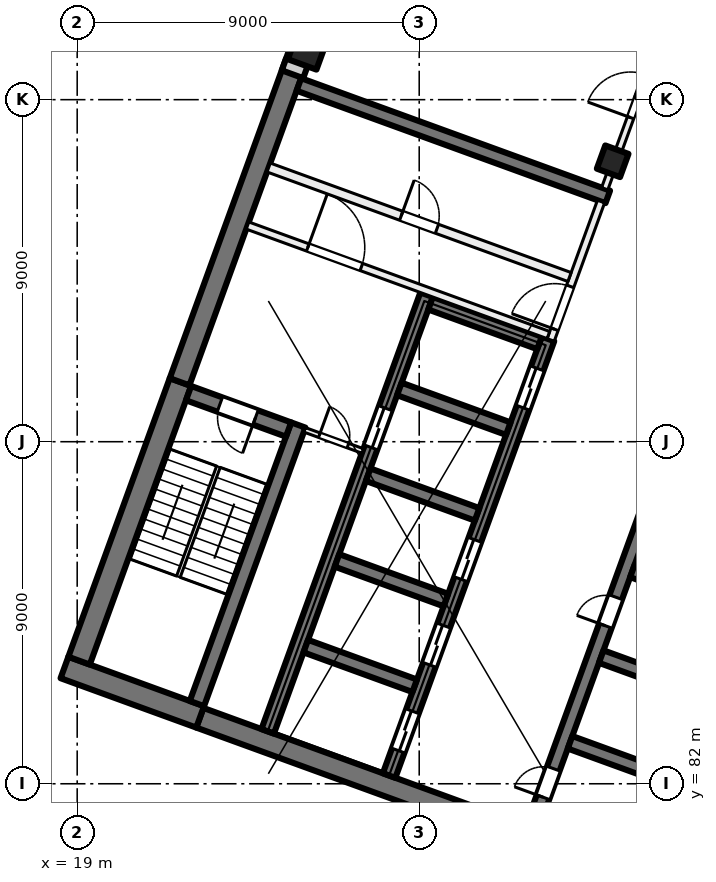
"""IFC4 building model, lengths in metres.
Left out: names, types, materials, properties, quantities, classifications, styles, units other than length and angle.
Written with IfcOpenShell. Run it as: python <this file> out.ifc"""

import sys

from ifc_helpers import new_model, si_unit, direction, frame, frame_2d, origin, origin_2d, place, context, subcontext, project, spatial, rectangle, extrude, element, fill, save


model = new_model("IFC4")
c1 = context("Model", 3, precision=1e-05, world=origin(), true_north=direction((0.0, 1.0)))
c2 = subcontext(c1, "Body", "Model", "MODEL_VIEW")
j1 = project(units=[si_unit("LENGTHUNIT", "METRE"), si_unit("PLANEANGLEUNIT", "RADIAN")], contexts=[c1])
p1 = place(None, origin())
s1 = spatial("IfcSite", under=j1, at=p1, CompositionType="ELEMENT")
p2 = place(p1, origin())
s2 = spatial("IfcBuilding", under=s1, at=p2, CompositionType="ELEMENT")
p3 = place(p2, frame((0.0, 0.0, 162.5)))
s3 = spatial("IfcBuildingStorey", under=s2, at=p3, CompositionType="ELEMENT", Elevation=162.5)
p4 = place(p3, frame((33.091, 98.379, 0.0), z_axis=(0.0, 0.0, 1.0), x_axis=(-0.342020143326, -0.939692620786, 0.0)))
e1 = element("IfcColumn", 1, at=p4, inside=s3, PredefinedType="COLUMN", context=c2, shape_type="SweptSolid", body=[
    extrude(rectangle(XDim=0.65, YDim=0.65, at=origin_2d()), origin(), (0.0, 0.0, 1.0), 4.0),
])
p5 = place(p3, frame((25.056, 101.303, 0.0), z_axis=(0.0, 0.0, 1.0), x_axis=(-0.342020143326, -0.939692620786, 0.0)))
e2 = element("IfcColumn", 2, at=p5, inside=s3, PredefinedType="COLUMN", context=c2, shape_type="SweptSolid", body=[
    extrude(rectangle(XDim=0.8, YDim=0.8, at=origin_2d()), origin(), (0.0, 0.0, 1.0), 4.0),
])
p6 = place(p3, frame((35.759, 78.811, 0.0), z_axis=(0.0, 0.0, 1.0), x_axis=(-0.939692894512, 0.342019391267, 0.0)))
e3 = element("IfcWall", 3, at=p6, inside=s3, PredefinedType="SHEAR", context=c2, shape_type="SweptSolid", body=[
    extrude(rectangle(XDim=14.4, YDim=0.55, at=frame_2d((7.2, 0.0))), origin(), (0.0, 0.0, 1.0), 4.0),
])
p7 = place(p3, frame((22.236, 83.76, 0.0), z_axis=(0.0, 0.0, 1.0), x_axis=(-0.939680822529, 0.342052557032, 0.0)))
e4 = element("IfcWall", 4, at=p7, inside=s3, PredefinedType="SHEAR", context=c2, shape_type="SweptSolid", body=[
    extrude(rectangle(XDim=3.8, YDim=0.6, at=frame_2d((1.9, 0.0))), origin(), (0.0, 0.0, 1.0), 4.0),
])
p8 = place(p3, frame((19.05, 85.239, 0.0), z_axis=(0.0, 0.0, 1.0), x_axis=(0.342016982193, 0.939693771338, 0.0)))
e5 = element("IfcWall", 5, at=p8, inside=s3, PredefinedType="SHEAR", context=c2, shape_type="SweptSolid", body=[
    extrude(rectangle(XDim=7.8, YDim=0.6, at=frame_2d((3.9, 0.0))), origin(), (0.0, 0.0, 1.0), 4.0),
])
p9 = place(p3, frame((21.694, 92.577, 0.0), z_axis=(0.0, 0.0, 1.0), x_axis=(0.342010253184, 0.939696220444, 0.0)))
e6 = element("IfcWall", 6, at=p9, inside=s3, PredefinedType="SHEAR", context=c2, shape_type="SweptSolid", body=[
    extrude(rectangle(XDim=8.95, YDim=0.55, at=frame_2d((4.475, 0.0))), origin(), (0.0, 0.0, 1.0), 4.0),
])
p10 = place(p3, frame((22.15, 84.11, 0.0), z_axis=(0.0, 0.0, 1.0), x_axis=(0.342016982193, 0.939693771338, 0.0)))
e7 = element("IfcWall", 7, at=p10, inside=s3, PredefinedType="SHEAR", context=c2, shape_type="SweptSolid", body=[
    extrude(rectangle(XDim=7.8, YDim=0.4, at=frame_2d((3.9, 0.0))), origin(), (0.0, 0.0, 1.0), 4.0),
])
p11 = place(p3, frame((24.562, 91.32, 0.0), z_axis=(0.0, 0.0, 1.0), x_axis=(-0.939717030584, 0.341953070509, 0.0)))
e8 = element("IfcWall", 8, at=p11, inside=s3, PredefinedType="SHEAR", context=c2, shape_type="SweptSolid", body=[
    extrude(rectangle(XDim=2.8, YDim=0.4, at=frame_2d((1.4, 0.0))), origin(), (0.0, 0.0, 1.0), 4.0),
])
p12 = place(p11, frame((0.925, 0.0, 0.0)))
e9 = element("IfcOpeningElement", 9, at=p12, cuts=e8, PredefinedType="OPENING", context=c2, shape_type="SweptSolid", body=[
    extrude(rectangle(XDim=1.0, YDim=2.1, at=frame_2d((0.5, 1.05))), frame((0.0, 0.21, 0.0), z_axis=(0.0, -1.0, 0.0), x_axis=(1.0, 0.0, 0.0)), (0.0, 0.0, 1.0), 0.42),
])
p13 = place(p3, frame((30.967, 80.848, 0.0), z_axis=(0.0, 0.0, 1.0), x_axis=(0.34201563943, 0.939694260058, 0.0)))
e10 = element("IfcWall", 10, at=p13, inside=s3, PredefinedType="SHEAR", context=c2, shape_type="SweptSolid", body=[
    extrude(rectangle(XDim=12.225, YDim=0.35, at=frame_2d((6.113, 0.0))), origin(), (0.0, 0.0, 1.0), 4.0),
])
p14 = place(p13, frame((0.85, 0.0, 0.0)))
e11 = element("IfcOpeningElement", 11, at=p14, cuts=e10, PredefinedType="OPENING", context=c2, shape_type="SweptSolid", body=[
    extrude(rectangle(XDim=0.8, YDim=2.1, at=frame_2d((0.4, 1.05))), frame((0.0, 0.185, 0.0), z_axis=(0.0, -1.0, 0.0), x_axis=(1.0, 0.0, 0.0)), (0.0, 0.0, 1.0), 0.37),
])
p15 = place(p13, frame((5.65, 0.0, 0.0)))
e12 = element("IfcOpeningElement", 12, at=p15, cuts=e10, PredefinedType="OPENING", context=c2, shape_type="SweptSolid", body=[
    extrude(rectangle(XDim=0.8, YDim=2.1, at=frame_2d((0.4, 1.05))), frame((0.0, 0.185, 0.0), z_axis=(0.0, -1.0, 0.0), x_axis=(1.0, 0.0, 0.0)), (0.0, 0.0, 1.0), 0.37),
])
p16 = place(p3, frame((34.835, 82.047, 0.0), z_axis=(0.0, 0.0, 1.0), x_axis=(-0.939683528043, 0.3420451244, 0.0)))
e13 = element("IfcWall", 13, at=p16, inside=s3, PredefinedType="SHEAR", context=c2, shape_type="SweptSolid", body=[
    extrude(rectangle(XDim=3.05, YDim=0.35, at=frame_2d((1.525, 0.0))), origin(), (0.0, 0.0, 1.0), 4.0),
])
p17 = place(p3, frame((35.656, 84.303, 0.0), z_axis=(0.0, 0.0, 1.0), x_axis=(-0.939709254651, 0.341974438698, 0.0)))
e14 = element("IfcWall", 14, at=p17, inside=s3, PredefinedType="SHEAR", context=c2, shape_type="SweptSolid", body=[
    extrude(rectangle(XDim=3.05, YDim=0.35, at=frame_2d((1.525, 0.0))), origin(), (0.0, 0.0, 1.0), 4.0),
])
p18 = place(p3, frame((36.477, 86.558, 0.0), z_axis=(0.0, 0.0, 1.0), x_axis=(-0.939683528043, 0.3420451244, 0.0)))
e15 = element("IfcWall", 15, at=p18, inside=s3, PredefinedType="SHEAR", context=c2, shape_type="SweptSolid", body=[
    extrude(rectangle(XDim=3.05, YDim=0.35, at=frame_2d((1.525, 0.0))), origin(), (0.0, 0.0, 1.0), 4.0),
])
p19 = place(p3, frame((27.208, 82.216, 0.0), z_axis=(0.0, 0.0, 1.0), x_axis=(0.34201563943, 0.939694260058, 0.0)))
e16 = element("IfcWall", 16, at=p19, inside=s3, PredefinedType="SHEAR", context=c2, shape_type="SweptSolid", body=[
    extrude(rectangle(XDim=12.225, YDim=0.35, at=frame_2d((6.113, 0.0))), origin(), (0.0, 0.0, 1.0), 4.0),
])
p20 = place(p19, frame((0.7, 0.0, 0.0)))
e17 = element("IfcOpeningElement", 17, at=p20, cuts=e16, PredefinedType="OPENING", context=c2, shape_type="SweptSolid", body=[
    extrude(rectangle(XDim=1.1, YDim=2.1, at=frame_2d((0.55, 1.05))), frame((0.0, 0.185, 0.0), z_axis=(0.0, -1.0, 0.0), x_axis=(1.0, 0.0, 0.0)), (0.0, 0.0, 1.0), 0.37),
])
p21 = place(p19, frame((3.1, 0.0, 0.0)))
e18 = element("IfcOpeningElement", 18, at=p21, cuts=e16, PredefinedType="OPENING", context=c2, shape_type="SweptSolid", body=[
    extrude(rectangle(XDim=1.1, YDim=2.1, at=frame_2d((0.55, 1.05))), frame((0.0, 0.185, 0.0), z_axis=(0.0, -1.0, 0.0), x_axis=(1.0, 0.0, 0.0)), (0.0, 0.0, 1.0), 0.37),
])
p22 = place(p19, frame((5.5, 0.0, 0.0)))
e19 = element("IfcOpeningElement", 19, at=p22, cuts=e16, PredefinedType="OPENING", context=c2, shape_type="SweptSolid", body=[
    extrude(rectangle(XDim=1.1, YDim=2.1, at=frame_2d((0.55, 1.05))), frame((0.0, 0.185, 0.0), z_axis=(0.0, -1.0, 0.0), x_axis=(1.0, 0.0, 0.0)), (0.0, 0.0, 1.0), 0.37),
])
p23 = place(p19, frame((10.3, 0.0, 0.0)))
e20 = element("IfcOpeningElement", 20, at=p23, cuts=e16, PredefinedType="OPENING", context=c2, shape_type="SweptSolid", body=[
    extrude(rectangle(XDim=1.1, YDim=2.1, at=frame_2d((0.55, 1.05))), frame((0.0, 0.185, 0.0), z_axis=(0.0, -1.0, 0.0), x_axis=(1.0, 0.0, 0.0)), (0.0, 0.0, 1.0), 0.37),
])
p24 = place(p3, frame((24.013, 83.379, 0.0), z_axis=(0.0, 0.0, 1.0), x_axis=(0.34201563943, 0.939694260058, 0.0)))
e21 = element("IfcWall", 21, at=p24, inside=s3, PredefinedType="SHEAR", context=c2, shape_type="SweptSolid", body=[
    extrude(rectangle(XDim=12.225, YDim=0.35, at=frame_2d((6.113, 0.0))), origin(), (0.0, 0.0, 1.0), 4.0),
])
p25 = place(p24, frame((7.95, 0.0, 0.0)))
e22 = element("IfcOpeningElement", 22, at=p25, cuts=e21, PredefinedType="OPENING", context=c2, shape_type="SweptSolid", body=[
    extrude(rectangle(XDim=1.1, YDim=2.1, at=frame_2d((0.55, 1.05))), frame((0.0, 0.185, 0.0), z_axis=(0.0, -1.0, 0.0), x_axis=(1.0, 0.0, 0.0)), (0.0, 0.0, 1.0), 0.37),
])
for number, where, z_axis, x_axis in (
    (23, (27.881, 84.578, 0.0), (0.0, 0.0, 1.0), (-0.94, 0.342, 0.0)),
    (24, (28.702, 86.833, 0.0), (0.0, 0.0, 1.0), (-0.94, 0.342, 0.0)),
    (25, (29.523, 89.089, 0.0), (0.0, 0.0, 1.0), (-0.94, 0.342, 0.0)),
):
    element("IfcWall", number, at=place(p3, frame(where, z_axis=z_axis, x_axis=x_axis)), inside=s3, PredefinedType="SHEAR", context=c2, shape_type="SweptSolid", body=[
        extrude(rectangle(XDim=3.05, YDim=0.35, at=frame_2d((1.525, 0.0))), origin(), (0.0, 0.0, 1.0), 4.0),
    ])
p26 = place(p3, frame((30.344, 91.344, 0.0), z_axis=(0.0, 0.0, 1.0), x_axis=(-0.939709254651, 0.341974438698, 0.0)))
e26 = element("IfcWall", 26, at=p26, inside=s3, PredefinedType="SHEAR", context=c2, shape_type="SweptSolid", body=[
    extrude(rectangle(XDim=3.05, YDim=0.35, at=frame_2d((1.525, 0.0))), origin(), (0.0, 0.0, 1.0), 4.0),
])
p27 = place(p3, frame((31.165, 93.599, 0.0), z_axis=(0.0, 0.0, 1.0), x_axis=(-0.939683528043, 0.3420451244, 0.0)))
e27 = element("IfcWall", 27, at=p27, inside=s3, PredefinedType="SHEAR", context=c2, shape_type="SweptSolid", body=[
    extrude(rectangle(XDim=3.05, YDim=0.35, at=frame_2d((1.525, 0.0))), origin(), (0.0, 0.0, 1.0), 4.0),
])
p28 = place(p3, frame((32.962, 97.441, 0.0), z_axis=(0.0, 0.0, 1.0), x_axis=(-0.939689545667, 0.342028592028, 0.0)))
e28 = element("IfcWall", 28, at=p28, inside=s3, PredefinedType="SHEAR", context=c2, shape_type="SweptSolid", body=[
    extrude(rectangle(XDim=8.65, YDim=0.35, at=frame_2d((4.325, 0.0))), origin(), (0.0, 0.0, 1.0), 4.0),
])
p29 = place(p3, frame((24.666, 100.669, 0.0), z_axis=(0.0, 0.0, 1.0), x_axis=(0.34201964167, 0.939692803373, 0.0)))
e29 = element("IfcWall", 29, at=p29, inside=s3, PredefinedType="SOLIDWALL", context=c2, shape_type="SweptSolid", body=[
    extrude(rectangle(XDim=32.884, YDim=0.6, at=frame_2d((16.442, 0.0))), origin(), (0.0, 0.0, 1.0), 3.625),
])
p30 = place(p29, frame((1.48, 0.0, 0.9)))
e30 = element("IfcOpeningElement", 30, at=p30, cuts=e29, PredefinedType="OPENING", context=c2, shape_type="SweptSolid", body=[
    extrude(rectangle(XDim=3.0, YDim=2.4, at=frame_2d((1.5, 1.2))), frame((0.0, 0.31, 0.0), z_axis=(0.0, -1.0, 0.0), x_axis=(1.0, 0.0, 0.0)), (0.0, 0.0, 1.0), 0.62),
])
p31 = place(p29, frame((5.98, 0.0, 0.9)))
e31 = element("IfcOpeningElement", 31, at=p31, cuts=e29, PredefinedType="OPENING", context=c2, shape_type="SweptSolid", body=[
    extrude(rectangle(XDim=3.0, YDim=2.4, at=frame_2d((1.5, 1.2))), frame((0.0, 0.31, 0.0), z_axis=(0.0, -1.0, 0.0), x_axis=(1.0, 0.0, 0.0)), (0.0, 0.0, 1.0), 0.62),
])
p32 = place(p29, frame((10.48, 0.0, 0.9)))
e32 = element("IfcOpeningElement", 32, at=p32, cuts=e29, PredefinedType="OPENING", context=c2, shape_type="SweptSolid", body=[
    extrude(rectangle(XDim=3.0, YDim=2.4, at=frame_2d((1.5, 1.2))), frame((0.0, 0.31, 0.0), z_axis=(0.0, -1.0, 0.0), x_axis=(1.0, 0.0, 0.0)), (0.0, 0.0, 1.0), 0.62),
])
p33 = place(p29, frame((14.98, 0.0, 0.9)))
e33 = element("IfcOpeningElement", 33, at=p33, cuts=e29, PredefinedType="OPENING", context=c2, shape_type="SweptSolid", body=[
    extrude(rectangle(XDim=3.0, YDim=2.4, at=frame_2d((1.5, 1.2))), frame((0.0, 0.31, 0.0), z_axis=(0.0, -1.0, 0.0), x_axis=(1.0, 0.0, 0.0)), (0.0, 0.0, 1.0), 0.62),
])
p34 = place(p29, frame((19.48, 0.0, 0.9)))
e34 = element("IfcOpeningElement", 34, at=p34, cuts=e29, PredefinedType="OPENING", context=c2, shape_type="SweptSolid", body=[
    extrude(rectangle(XDim=3.0, YDim=2.4, at=frame_2d((1.5, 1.2))), frame((0.0, 0.31, 0.0), z_axis=(0.0, -1.0, 0.0), x_axis=(1.0, 0.0, 0.0)), (0.0, 0.0, 1.0), 0.62),
])
p35 = place(p29, frame((23.98, 0.0, 0.9)))
e35 = element("IfcOpeningElement", 35, at=p35, cuts=e29, PredefinedType="OPENING", context=c2, shape_type="SweptSolid", body=[
    extrude(rectangle(XDim=3.0, YDim=2.4, at=frame_2d((1.5, 1.2))), frame((0.0, 0.31, 0.0), z_axis=(0.0, -1.0, 0.0), x_axis=(1.0, 0.0, 0.0)), (0.0, 0.0, 1.0), 0.62),
])
p36 = place(p29, frame((28.48, 0.0, 0.9)))
e36 = element("IfcOpeningElement", 36, at=p36, cuts=e29, PredefinedType="OPENING", context=c2, shape_type="SweptSolid", body=[
    extrude(rectangle(XDim=3.0, YDim=2.4, at=frame_2d((1.5, 1.2))), frame((0.0, 0.31, 0.0), z_axis=(0.0, -1.0, 0.0), x_axis=(1.0, 0.0, 0.0)), (0.0, 0.0, 1.0), 0.62),
])
p37 = place(p3, frame((31.459, 93.678, 0.0), z_axis=(0.0, 0.0, 1.0), x_axis=(0.341985870128, 0.939705094502, 0.0)))
e37 = element("IfcWall", 37, at=p37, inside=s3, PredefinedType="PARTITIONING", context=c2, shape_type="SweptSolid", body=[
    extrude(rectangle(XDim=3.875, YDim=0.2, at=frame_2d((1.938, 0.0))), origin(), (0.0, 0.0, 1.0), 3.625),
])
p38 = place(p37, frame((0.3, 0.0, 0.0)))
e38 = element("IfcOpeningElement", 38, at=p38, cuts=e37, PredefinedType="OPENING", context=c2, shape_type="SweptSolid", body=[
    extrude(rectangle(XDim=1.2, YDim=2.1, at=frame_2d((0.6, 1.05))), frame((0.0, 0.11, 0.0), z_axis=(0.0, -1.0, 0.0), x_axis=(1.0, 0.0, 0.0)), (0.0, 0.0, 1.0), 0.22),
])
p39 = place(p3, frame((23.483, 96.688, 0.0), z_axis=(0.0, 0.0, 1.0), x_axis=(0.939691007314, -0.342024576271, 0.0)))
e39 = element("IfcWall", 39, at=p39, inside=s3, PredefinedType="PARTITIONING", context=c2, shape_type="SweptSolid", body=[
    extrude(rectangle(XDim=8.425, YDim=0.2, at=frame_2d((4.212, 0.0))), origin(), (0.0, 0.0, 1.0), 3.625),
])
p40 = place(p39, frame((1.688, 0.0, 0.0)))
e40 = element("IfcOpeningElement", 40, at=p40, cuts=e39, PredefinedType="OPENING", context=c2, shape_type="SweptSolid", body=[
    extrude(rectangle(XDim=1.5, YDim=2.1, at=frame_2d((0.75, 1.05))), frame((0.0, 0.11, 0.0), z_axis=(0.0, -1.0, 0.0), x_axis=(1.0, 0.0, 0.0)), (0.0, 0.0, 1.0), 0.22),
])
p41 = place(p3, frame((24.039, 98.215, 0.0), z_axis=(0.0, 0.0, 1.0), x_axis=(0.939687617333, -0.342033889887, 0.0)))
e41 = element("IfcWall", 41, at=p41, inside=s3, PredefinedType="PARTITIONING", context=c2, shape_type="SweptSolid", body=[
    extrude(rectangle(XDim=8.425, YDim=0.25, at=frame_2d((4.212, 0.0))), origin(), (0.0, 0.0, 1.0), 3.625),
])
p42 = place(p41, frame((3.712, 0.0, 0.0)))
e42 = element("IfcOpeningElement", 42, at=p42, cuts=e41, PredefinedType="OPENING", context=c2, shape_type="SweptSolid", body=[
    extrude(rectangle(XDim=1.0, YDim=2.1, at=frame_2d((0.5, 1.05))), frame((0.0, 0.135, 0.0), z_axis=(0.0, -1.0, 0.0), x_axis=(1.0, 0.0, 0.0)), (0.0, 0.0, 1.0), 0.27),
])
p43 = place(p3, frame((24.985, 91.312, 0.0), z_axis=(0.0, 0.0, 1.0), x_axis=(0.939705651352, -0.341984340019, 0.0)))
e43 = element("IfcWall", 43, at=p43, inside=s3, PredefinedType="PARTITIONING", context=c2, shape_type="SweptSolid", body=[
    extrude(rectangle(XDim=1.625, YDim=0.125, at=frame_2d((0.812, 0.0))), origin(), (0.0, 0.0, 1.0), 3.625),
])
p44 = place(p43, frame((0.413, 0.0, 0.0)))
e44 = element("IfcOpeningElement", 44, at=p44, cuts=e43, PredefinedType="OPENING", context=c2, shape_type="SweptSolid", body=[
    extrude(rectangle(XDim=0.8, YDim=2.1, at=frame_2d((0.4, 1.05))), frame((0.0, 0.073, 0.0), z_axis=(0.0, -1.0, 0.0), x_axis=(1.0, 0.0, 0.0)), (0.0, 0.0, 1.0), 0.145),
])
p45 = place(p3, frame((32.881, 97.657, 0.0), z_axis=(0.0, 0.0, 1.0), x_axis=(0.342058204353, 0.939678766832, 0.0)))
e45 = element("IfcWall", 45, at=p45, inside=s3, PredefinedType="PARTITIONING", context=c2, shape_type="SweptSolid", body=[
    extrude(rectangle(XDim=5.163, YDim=0.175, at=frame_2d((2.581, 0.0))), origin(), (0.0, 0.0, 1.0), 3.625),
])
p46 = place(p45, frame((1.991, 0.0, 0.0)))
e46 = element("IfcOpeningElement", 46, at=p46, cuts=e45, PredefinedType="OPENING", context=c2, shape_type="SweptSolid", body=[
    extrude(rectangle(XDim=1.2, YDim=2.1, at=frame_2d((0.6, 1.05))), frame((0.0, 0.097, 0.0), z_axis=(0.0, -1.0, 0.0), x_axis=(1.0, 0.0, 0.0)), (0.0, 0.0, 1.0), 0.195),
])
p47 = place(p20, origin())
e47 = element("IfcDoor", 47, at=p47, inside=s3, OperationType="DOUBLE_DOOR_SLIDING", PredefinedType="DOOR", context=c2, shape_type="SweptSolid", body=[
    extrude(rectangle(XDim=1.1, YDim=2.1, at=frame_2d((0.55, 1.05))), frame((0.0, 0.025, 0.0), z_axis=(0.0, -1.0, 0.0), x_axis=(1.0, 0.0, 0.0)), (0.0, 0.0, 1.0), 0.05),
])
fill(e17, e47)
p48 = place(p21, origin())
e48 = element("IfcDoor", 48, at=p48, inside=s3, OperationType="DOUBLE_DOOR_SLIDING", PredefinedType="DOOR", context=c2, shape_type="SweptSolid", body=[
    extrude(rectangle(XDim=1.1, YDim=2.1, at=frame_2d((0.55, 1.05))), frame((0.0, 0.025, 0.0), z_axis=(0.0, -1.0, 0.0), x_axis=(1.0, 0.0, 0.0)), (0.0, 0.0, 1.0), 0.05),
])
fill(e18, e48)
p49 = place(p22, origin())
e49 = element("IfcDoor", 49, at=p49, inside=s3, OperationType="DOUBLE_DOOR_SLIDING", PredefinedType="DOOR", context=c2, shape_type="SweptSolid", body=[
    extrude(rectangle(XDim=1.1, YDim=2.1, at=frame_2d((0.55, 1.05))), frame((0.0, 0.025, 0.0), z_axis=(0.0, -1.0, 0.0), x_axis=(1.0, 0.0, 0.0)), (0.0, 0.0, 1.0), 0.05),
])
fill(e19, e49)
p50 = place(p23, origin())
e50 = element("IfcDoor", 50, at=p50, inside=s3, OperationType="DOUBLE_DOOR_SLIDING", PredefinedType="DOOR", context=c2, shape_type="SweptSolid", body=[
    extrude(rectangle(XDim=1.1, YDim=2.1, at=frame_2d((0.55, 1.05))), frame((0.0, 0.025, 0.0), z_axis=(0.0, -1.0, 0.0), x_axis=(1.0, 0.0, 0.0)), (0.0, 0.0, 1.0), 0.05),
])
fill(e20, e50)
p51 = place(p14, origin())
e51 = element("IfcDoor", 51, at=p51, inside=s3, OperationType="SINGLE_SWING_LEFT", PredefinedType="DOOR", context=c2, shape_type="SweptSolid", body=[
    extrude(rectangle(XDim=0.8, YDim=2.1, at=frame_2d((0.4, 1.05))), frame((0.0, 0.025, 0.0), z_axis=(0.0, -1.0, 0.0), x_axis=(1.0, 0.0, 0.0)), (0.0, 0.0, 1.0), 0.05),
])
fill(e11, e51)
p52 = place(p15, origin())
e52 = element("IfcDoor", 52, at=p52, inside=s3, OperationType="SINGLE_SWING_RIGHT", PredefinedType="DOOR", context=c2, shape_type="SweptSolid", body=[
    extrude(rectangle(XDim=0.8, YDim=2.1, at=frame_2d((0.4, 1.05))), frame((0.0, 0.025, 0.0), z_axis=(0.0, -1.0, 0.0), x_axis=(1.0, 0.0, 0.0)), (0.0, 0.0, 1.0), 0.05),
])
fill(e12, e52)
p53 = place(p38, origin())
e53 = element("IfcDoor", 53, at=p53, inside=s3, OperationType="DOUBLE_DOOR_SINGLE_SWING", PredefinedType="DOOR", context=c2, shape_type="SweptSolid", body=[
    extrude(rectangle(XDim=1.2, YDim=2.1, at=frame_2d((0.6, 1.05))), frame((0.0, 0.025, 0.0), z_axis=(0.0, -1.0, 0.0), x_axis=(1.0, 0.0, 0.0)), (0.0, 0.0, 1.0), 0.05),
])
fill(e38, e53)
p54 = place(p40, origin())
e54 = element("IfcDoor", 54, at=p54, inside=s3, OperationType="DOUBLE_DOOR_SINGLE_SWING", PredefinedType="DOOR", context=c2, shape_type="SweptSolid", body=[
    extrude(rectangle(XDim=1.5, YDim=2.1, at=frame_2d((0.75, 1.05))), frame((0.0, 0.025, 0.0), z_axis=(0.0, -1.0, 0.0), x_axis=(1.0, 0.0, 0.0)), (0.0, 0.0, 1.0), 0.05),
])
fill(e40, e54)
p55 = place(p12, origin())
e55 = element("IfcDoor", 55, at=p55, inside=s3, OperationType="SINGLE_SWING_LEFT", PredefinedType="DOOR", context=c2, shape_type="SweptSolid", body=[
    extrude(rectangle(XDim=1.0, YDim=2.1, at=frame_2d((0.5, 1.05))), frame((0.0, 0.025, 0.0), z_axis=(0.0, -1.0, 0.0), x_axis=(1.0, 0.0, 0.0)), (0.0, 0.0, 1.0), 0.05),
])
fill(e9, e55)
p56 = place(p44, origin())
e56 = element("IfcDoor", 56, at=p56, inside=s3, OperationType="SINGLE_SWING_RIGHT", PredefinedType="DOOR", context=c2, shape_type="SweptSolid", body=[
    extrude(rectangle(XDim=0.8, YDim=2.1, at=frame_2d((0.4, 1.05))), frame((0.0, 0.025, 0.0), z_axis=(0.0, -1.0, 0.0), x_axis=(1.0, 0.0, 0.0)), (0.0, 0.0, 1.0), 0.05),
])
fill(e44, e56)
p57 = place(p42, origin())
e57 = element("IfcDoor", 57, at=p57, inside=s3, OperationType="SINGLE_SWING_LEFT", PredefinedType="DOOR", context=c2, shape_type="SweptSolid", body=[
    extrude(rectangle(XDim=1.0, YDim=2.1, at=frame_2d((0.5, 1.05))), frame((0.0, 0.025, 0.0), z_axis=(0.0, -1.0, 0.0), x_axis=(1.0, 0.0, 0.0)), (0.0, 0.0, 1.0), 0.05),
])
fill(e42, e57)
p58 = place(p25, origin())
e58 = element("IfcDoor", 58, at=p58, inside=s3, OperationType="DOUBLE_DOOR_SLIDING", PredefinedType="DOOR", context=c2, shape_type="SweptSolid", body=[
    extrude(rectangle(XDim=1.1, YDim=2.1, at=frame_2d((0.55, 1.05))), frame((0.0, 0.025, 0.0), z_axis=(0.0, -1.0, 0.0), x_axis=(1.0, 0.0, 0.0)), (0.0, 0.0, 1.0), 0.05),
])
fill(e22, e58)
p59 = place(p46, origin())
e59 = element("IfcDoor", 59, at=p59, inside=s3, OperationType="DOUBLE_DOOR_SINGLE_SWING", PredefinedType="DOOR", context=c2, shape_type="SweptSolid", body=[
    extrude(rectangle(XDim=1.2, YDim=2.1, at=frame_2d((0.6, 1.05))), frame((0.0, 0.025, 0.0), z_axis=(0.0, -1.0, 0.0), x_axis=(1.0, 0.0, 0.0)), (0.0, 0.0, 1.0), 0.05),
])
fill(e46, e59)
save(model, sys.argv[1])
